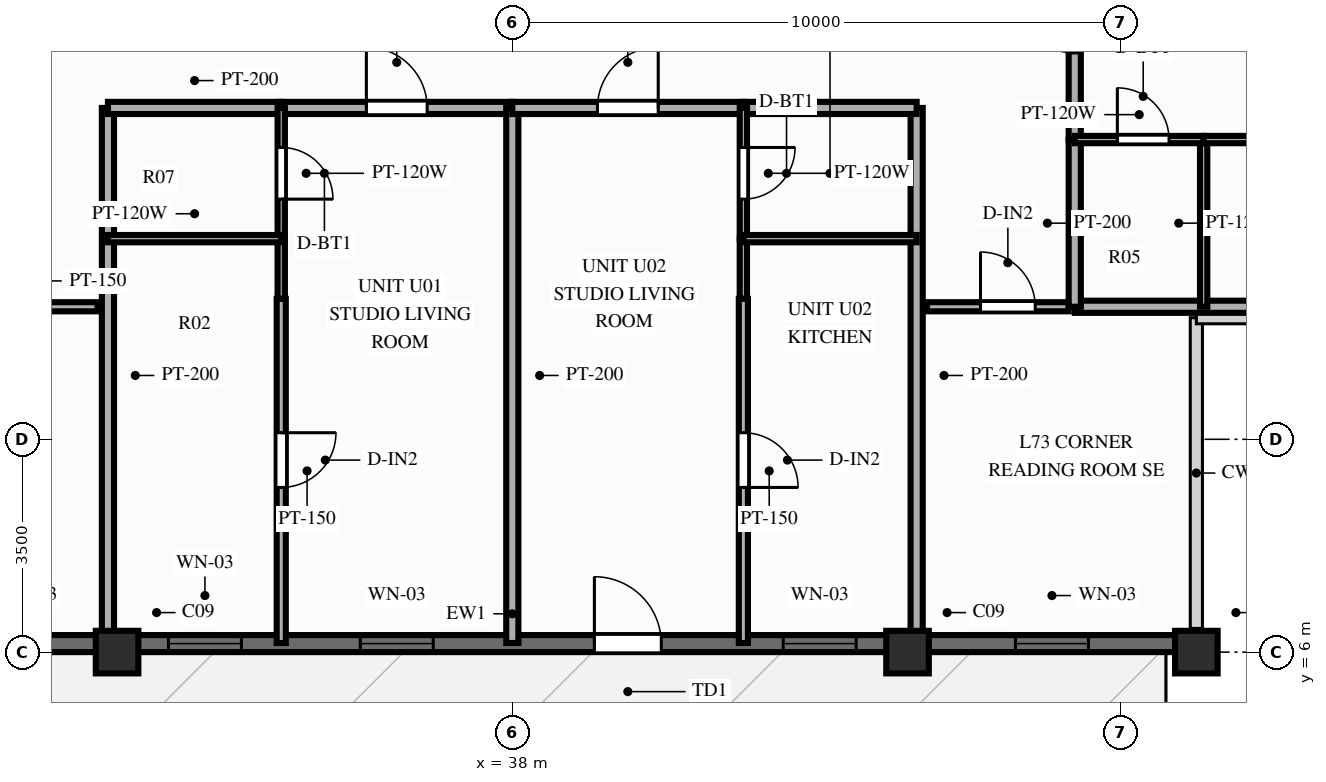
"""IFC4 building model, lengths in metres.
Left out: names, types, materials, properties, quantities, classifications, styles, units other than length and angle.
Written with IfcOpenShell. Run it as: python <this file> out.ifc"""

import sys

from ifc_helpers import new_model, si_unit, direction, frame, frame_2d, origin, origin_2d, place, context, subcontext, project, spatial, rectangle, extrude, source, transform, mapped, element, fill, save


model = new_model("IFC4")
c1 = context("Model", 3, precision=1e-05, world=origin(), true_north=direction((0.0, 1.0)))
c2 = subcontext(c1, "Body", "Model", "MODEL_VIEW")
j1 = project(units=[si_unit("LENGTHUNIT", "METRE"), si_unit("PLANEANGLEUNIT", "RADIAN")], contexts=[c1])
p1 = place(None, origin())
s1 = spatial("IfcSite", under=j1, at=p1, CompositionType="ELEMENT")
p2 = place(p1, origin())
s2 = spatial("IfcBuilding", under=s1, at=p2, CompositionType="ELEMENT")
p3 = place(p2, frame((0.0, 0.0, 236.1)))
s3 = spatial("IfcBuildingStorey", under=s2, at=p3, CompositionType="ELEMENT", Elevation=236.1)
m1 = source(origin(), c2, "Body", "SweptSolid", [
    extrude(rectangle(XDim=0.7, YDim=0.7, at=origin_2d()), origin(), (0.0, 0.0, 1.0), 3.9),
])
for number, where, z_axis, x_axis in (
    (1, (31.5, 6.0, 0.0), (0.0, 0.0, 1.0), (1.0, 0.0, 0.0)),
    (2, (44.5, 6.0, 0.0), (0.0, 0.0, 1.0), (1.0, 0.0, 0.0)),
    (3, (49.25, 6.0, 0.0), (0.0, 0.0, 1.0), (1.0, 0.0, 0.0)),
):
    element("IfcColumn", number, at=place(p3, frame(where, z_axis=z_axis, x_axis=x_axis)), inside=s3, PredefinedType="COLUMN", context=c2, shape_type="MappedRepresentation", body=[
        mapped(m1, transform((0.0, 0.0, 0.0), scale=1.0)),
    ])
p4 = place(p3, frame((26.75, 6.14, 0.0), z_axis=(0.0, 0.0, 1.0), x_axis=(1.0, 0.0, 0.0)))
e4 = element("IfcWall", 4, at=p4, inside=s3, PredefinedType="SOLIDWALL", context=c2, shape_type="SweptSolid", body=[
    extrude(rectangle(XDim=22.5, YDim=0.28, at=frame_2d((11.25, 0.0))), origin(), (0.0, 0.0, 1.0), 2.44),
])
p5 = place(p4, frame((1.775, 0.0, 0.25)))
e5 = element("IfcOpeningElement", 5, at=p5, cuts=e4, PredefinedType="OPENING", context=c2, shape_type="SweptSolid", body=[
    extrude(rectangle(XDim=1.2, YDim=1.5, at=frame_2d((0.6, 0.75))), frame((0.0, 0.152, 0.0), z_axis=(0.0, -1.0, 0.0), x_axis=(1.0, 0.0, 0.0)), (0.0, 0.0, 1.0), 0.304),
])
p6 = place(p4, frame((5.595, 0.0, 0.25)))
e6 = element("IfcOpeningElement", 6, at=p6, cuts=e4, PredefinedType="OPENING", context=c2, shape_type="SweptSolid", body=[
    extrude(rectangle(XDim=1.2, YDim=1.5, at=frame_2d((0.6, 0.75))), frame((0.0, 0.152, 0.0), z_axis=(0.0, -1.0, 0.0), x_axis=(1.0, 0.0, 0.0)), (0.0, 0.0, 1.0), 0.304),
])
p7 = place(p4, frame((8.75, 0.0, 0.25)))
e7 = element("IfcOpeningElement", 7, at=p7, cuts=e4, PredefinedType="OPENING", context=c2, shape_type="SweptSolid", body=[
    extrude(rectangle(XDim=1.2, YDim=1.5, at=frame_2d((0.6, 0.75))), frame((0.0, 0.152, 0.0), z_axis=(0.0, -1.0, 0.0), x_axis=(1.0, 0.0, 0.0)), (0.0, 0.0, 1.0), 0.304),
])
p8 = place(p4, frame((13.7, 0.0, 0.0), z_axis=(0.0, 0.0, 1.0), x_axis=(-1.0, 0.0, 0.0)))
e8 = element("IfcOpeningElement", 8, at=p8, cuts=e4, PredefinedType="OPENING", context=c2, shape_type="SweptSolid", body=[
    extrude(rectangle(XDim=1.1, YDim=2.15, at=frame_2d((0.55, 1.075))), frame((0.0, 0.152, 0.0), z_axis=(0.0, -1.0, 0.0), x_axis=(1.0, 0.0, 0.0)), (0.0, 0.0, 1.0), 0.304),
])
p9 = place(p4, frame((15.705, 0.0, 0.25)))
e9 = element("IfcOpeningElement", 9, at=p9, cuts=e4, PredefinedType="OPENING", context=c2, shape_type="SweptSolid", body=[
    extrude(rectangle(XDim=1.2, YDim=1.5, at=frame_2d((0.6, 0.75))), frame((0.0, 0.152, 0.0), z_axis=(0.0, -1.0, 0.0), x_axis=(1.0, 0.0, 0.0)), (0.0, 0.0, 1.0), 0.304),
])
p10 = place(p4, frame((19.525, 0.0, 0.25)))
e10 = element("IfcOpeningElement", 10, at=p10, cuts=e4, PredefinedType="OPENING", context=c2, shape_type="SweptSolid", body=[
    extrude(rectangle(XDim=1.2, YDim=1.5, at=frame_2d((0.6, 0.75))), frame((0.0, 0.152, 0.0), z_axis=(0.0, -1.0, 0.0), x_axis=(1.0, 0.0, 0.0)), (0.0, 0.0, 1.0), 0.304),
])
p11 = place(p3, frame((28.85, 11.68, 0.0), z_axis=(0.0, 0.0, 1.0), x_axis=(1.0, 0.0, 0.0)))
e11 = element("IfcWall", 11, at=p11, inside=s3, PredefinedType="PARTITIONING", context=c2, shape_type="SweptSolid", body=[
    extrude(rectangle(XDim=2.33, YDim=0.15, at=frame_2d((1.165, 0.0))), origin(), (0.0, 0.0, 1.0), 2.24),
])
p12 = place(p11, frame((0.55, 0.0, 0.0)))
e12 = element("IfcOpeningElement", 12, at=p12, cuts=e11, PredefinedType="OPENING", context=c2, shape_type="SweptSolid", body=[
    extrude(rectangle(XDim=0.9, YDim=2.1, at=frame_2d((0.45, 1.05))), frame((0.0, 0.087, 0.0), z_axis=(0.0, -1.0, 0.0), x_axis=(1.0, 0.0, 0.0)), (0.0, 0.0, 1.0), 0.174),
])
p13 = place(p3, frame((44.82, 11.68, 0.0), z_axis=(0.0, 0.0, 1.0), x_axis=(1.0, 0.0, 0.0)))
e13 = element("IfcWall", 13, at=p13, inside=s3, PredefinedType="PARTITIONING", context=c2, shape_type="SweptSolid", body=[
    extrude(rectangle(XDim=2.33, YDim=0.15, at=frame_2d((1.165, 0.0))), origin(), (0.0, 0.0, 1.0), 2.24),
])
p14 = place(p13, frame((0.88, 0.0, 0.0)))
e14 = element("IfcOpeningElement", 14, at=p14, cuts=e13, PredefinedType="OPENING", context=c2, shape_type="SweptSolid", body=[
    extrude(rectangle(XDim=0.9, YDim=2.1, at=frame_2d((0.45, 1.05))), frame((0.0, 0.087, 0.0), z_axis=(0.0, -1.0, 0.0), x_axis=(1.0, 0.0, 0.0)), (0.0, 0.0, 1.0), 0.174),
])
for number, where, z_axis, x_axis in (
    (15, (31.35, 14.95, 0.0), (0.0, 0.0, 1.0), (0.0, -1.0, 0.0)),
    (16, (44.65, 14.95, 0.0), (0.0, 0.0, 1.0), (0.0, -1.0, 0.0)),
):
    element("IfcWall", number, at=place(p3, frame(where, z_axis=z_axis, x_axis=x_axis)), inside=s3, PredefinedType="PARTITIONING", context=c2, shape_type="SweptSolid", body=[
        extrude(rectangle(XDim=8.8, YDim=0.2, at=frame_2d((4.4, 0.0))), origin(), (0.0, 0.0, 1.0), 2.44),
    ])
p15 = place(p3, frame((31.35, 14.95, 0.0), z_axis=(0.0, 0.0, 1.0), x_axis=(1.0, 0.0, 0.0)))
e17 = element("IfcWall", 17, at=p15, inside=s3, PredefinedType="PARTITIONING", context=c2, shape_type="SweptSolid", body=[
    extrude(rectangle(XDim=2.85, YDim=0.2, at=frame_2d((1.425, 0.0))), origin(), (0.0, 0.0, 1.0), 3.56),
])
p16 = place(p3, frame((34.2, 14.95, 0.0), z_axis=(0.0, 0.0, 1.0), x_axis=(1.0, 0.0, 0.0)))
e18 = element("IfcWall", 18, at=p16, inside=s3, PredefinedType="PARTITIONING", context=c2, shape_type="SweptSolid", body=[
    extrude(rectangle(XDim=3.8, YDim=0.2, at=frame_2d((1.9, 0.0))), origin(), (0.0, 0.0, 1.0), 3.56),
])
p17 = place(p16, frame((1.4, 0.0, 0.0)))
e19 = element("IfcOpeningElement", 19, at=p17, cuts=e18, PredefinedType="OPENING", context=c2, shape_type="SweptSolid", body=[
    extrude(rectangle(XDim=1.0, YDim=2.15, at=frame_2d((0.5, 1.075))), frame((0.0, 0.112, 0.0), z_axis=(0.0, -1.0, 0.0), x_axis=(1.0, 0.0, 0.0)), (0.0, 0.0, 1.0), 0.224),
])
p18 = place(p3, frame((34.2, 14.95, 0.0), z_axis=(0.0, 0.0, 1.0), x_axis=(0.0, -1.0, 0.0)))
e20 = element("IfcWall", 20, at=p18, inside=s3, PredefinedType="PARTITIONING", context=c2, shape_type="SweptSolid", body=[
    extrude(rectangle(XDim=2.15, YDim=0.12, at=frame_2d((1.075, 0.0))), origin(), (0.0, 0.0, 1.0), 3.56),
])
p19 = place(p18, frame((0.65, 0.0, 0.0)))
e21 = element("IfcOpeningElement", 21, at=p19, cuts=e20, PredefinedType="OPENING", context=c2, shape_type="SweptSolid", body=[
    extrude(rectangle(XDim=0.85, YDim=2.05, at=frame_2d((0.425, 1.025))), frame((0.0, 0.072, 0.0), z_axis=(0.0, -1.0, 0.0), x_axis=(1.0, 0.0, 0.0)), (0.0, 0.0, 1.0), 0.144),
])
p20 = place(p3, frame((34.2, 12.8, 0.0), z_axis=(0.0, 0.0, 1.0), x_axis=(0.0, -1.0, 0.0)))
e22 = element("IfcWall", 22, at=p20, inside=s3, PredefinedType="PARTITIONING", context=c2, shape_type="SweptSolid", body=[
    extrude(rectangle(XDim=0.99, YDim=0.12, at=frame_2d((0.495, 0.0))), origin(), (0.0, 0.0, 1.0), 3.56),
])
p21 = place(p3, frame((31.35, 12.8, 0.0), z_axis=(0.0, 0.0, 1.0), x_axis=(1.0, 0.0, 0.0)))
e23 = element("IfcWall", 23, at=p21, inside=s3, PredefinedType="PARTITIONING", context=c2, shape_type="SweptSolid", body=[
    extrude(rectangle(XDim=2.85, YDim=0.12, at=frame_2d((1.425, 0.0))), origin(), (0.0, 0.0, 1.0), 3.56),
])
p22 = place(p3, frame((34.2, 11.81, 0.0), z_axis=(0.0, 0.0, 1.0), x_axis=(0.0, -1.0, 0.0)))
e24 = element("IfcWall", 24, at=p22, inside=s3, PredefinedType="PARTITIONING", context=c2, shape_type="SweptSolid", body=[
    extrude(rectangle(XDim=5.66, YDim=0.15, at=frame_2d((2.83, 0.0))), origin(), (0.0, 0.0, 1.0), 3.56),
])
p23 = place(p22, frame((2.202, 0.0, 0.0)))
e25 = element("IfcOpeningElement", 25, at=p23, cuts=e24, PredefinedType="OPENING", context=c2, shape_type="SweptSolid", body=[
    extrude(rectangle(XDim=0.9, YDim=2.1, at=frame_2d((0.45, 1.05))), frame((0.0, 0.087, 0.0), z_axis=(0.0, -1.0, 0.0), x_axis=(1.0, 0.0, 0.0)), (0.0, 0.0, 1.0), 0.174),
])
p24 = place(p3, frame((38.0, 14.95, 0.0), z_axis=(0.0, 0.0, 1.0), x_axis=(0.0, -1.0, 0.0)))
e26 = element("IfcWall", 26, at=p24, inside=s3, PredefinedType="PARTITIONING", context=c2, shape_type="SweptSolid", body=[
    extrude(rectangle(XDim=8.8, YDim=0.2, at=frame_2d((4.4, 0.0))), origin(), (0.0, 0.0, 1.0), 3.56),
])
p25 = place(p3, frame((38.0, 14.95, 0.0), z_axis=(0.0, 0.0, 1.0), x_axis=(1.0, 0.0, 0.0)))
e27 = element("IfcWall", 27, at=p25, inside=s3, PredefinedType="PARTITIONING", context=c2, shape_type="SweptSolid", body=[
    extrude(rectangle(XDim=3.8, YDim=0.2, at=frame_2d((1.9, 0.0))), origin(), (0.0, 0.0, 1.0), 3.56),
])
p26 = place(p25, frame((1.4, 0.0, 0.0)))
e28 = element("IfcOpeningElement", 28, at=p26, cuts=e27, PredefinedType="OPENING", context=c2, shape_type="SweptSolid", body=[
    extrude(rectangle(XDim=1.0, YDim=2.15, at=frame_2d((0.5, 1.075))), frame((0.0, 0.112, 0.0), z_axis=(0.0, -1.0, 0.0), x_axis=(1.0, 0.0, 0.0)), (0.0, 0.0, 1.0), 0.224),
])
p27 = place(p3, frame((41.8, 14.95, 0.0), z_axis=(0.0, 0.0, 1.0), x_axis=(1.0, 0.0, 0.0)))
e29 = element("IfcWall", 29, at=p27, inside=s3, PredefinedType="PARTITIONING", context=c2, shape_type="SweptSolid", body=[
    extrude(rectangle(XDim=2.85, YDim=0.2, at=frame_2d((1.425, 0.0))), origin(), (0.0, 0.0, 1.0), 3.56),
])
p28 = place(p3, frame((41.8, 14.95, 0.0), z_axis=(0.0, 0.0, 1.0), x_axis=(0.0, -1.0, 0.0)))
e30 = element("IfcWall", 30, at=p28, inside=s3, PredefinedType="PARTITIONING", context=c2, shape_type="SweptSolid", body=[
    extrude(rectangle(XDim=2.15, YDim=0.12, at=frame_2d((1.075, 0.0))), origin(), (0.0, 0.0, 1.0), 3.56),
])
p29 = place(p28, frame((0.65, 0.0, 0.0)))
e31 = element("IfcOpeningElement", 31, at=p29, cuts=e30, PredefinedType="OPENING", context=c2, shape_type="SweptSolid", body=[
    extrude(rectangle(XDim=0.85, YDim=2.05, at=frame_2d((0.425, 1.025))), frame((0.0, 0.072, 0.0), z_axis=(0.0, -1.0, 0.0), x_axis=(1.0, 0.0, 0.0)), (0.0, 0.0, 1.0), 0.144),
])
p30 = place(p3, frame((41.8, 12.8, 0.0), z_axis=(0.0, 0.0, 1.0), x_axis=(0.0, -1.0, 0.0)))
e32 = element("IfcWall", 32, at=p30, inside=s3, PredefinedType="PARTITIONING", context=c2, shape_type="SweptSolid", body=[
    extrude(rectangle(XDim=0.99, YDim=0.12, at=frame_2d((0.495, 0.0))), origin(), (0.0, 0.0, 1.0), 3.56),
])
p31 = place(p3, frame((41.8, 12.8, 0.0), z_axis=(0.0, 0.0, 1.0), x_axis=(1.0, 0.0, 0.0)))
e33 = element("IfcWall", 33, at=p31, inside=s3, PredefinedType="PARTITIONING", context=c2, shape_type="SweptSolid", body=[
    extrude(rectangle(XDim=2.85, YDim=0.12, at=frame_2d((1.425, 0.0))), origin(), (0.0, 0.0, 1.0), 3.56),
])
p32 = place(p3, frame((41.8, 11.81, 0.0), z_axis=(0.0, 0.0, 1.0), x_axis=(0.0, -1.0, 0.0)))
e34 = element("IfcWall", 34, at=p32, inside=s3, PredefinedType="PARTITIONING", context=c2, shape_type="SweptSolid", body=[
    extrude(rectangle(XDim=5.66, YDim=0.15, at=frame_2d((2.83, 0.0))), origin(), (0.0, 0.0, 1.0), 3.56),
])
p33 = place(p32, frame((2.202, 0.0, 0.0)))
e35 = element("IfcOpeningElement", 35, at=p33, cuts=e34, PredefinedType="OPENING", context=c2, shape_type="SweptSolid", body=[
    extrude(rectangle(XDim=0.9, YDim=2.1, at=frame_2d((0.45, 1.05))), frame((0.0, 0.087, 0.0), z_axis=(0.0, -1.0, 0.0), x_axis=(1.0, 0.0, 0.0)), (0.0, 0.0, 1.0), 0.174),
])
p34 = place(p3, frame((47.25, 11.68, 0.0), z_axis=(0.0, 0.0, 1.0), x_axis=(1.0, 0.0, 0.0)))
e36 = element("IfcWall", 36, at=p34, inside=s3, PredefinedType="PARTITIONING", context=c2, shape_type="SweptSolid", body=[
    extrude(rectangle(XDim=7.35, YDim=0.2, at=frame_2d((3.675, 0.0))), origin(), (0.0, 0.0, 1.0), 2.24),
])
p35 = place(p3, frame((47.25, 11.68, 0.0), z_axis=(0.0, 0.0, 1.0), x_axis=(0.0, 1.0, 0.0)))
e37 = element("IfcWall", 37, at=p35, inside=s3, PredefinedType="PARTITIONING", context=c2, shape_type="SweptSolid", body=[
    extrude(rectangle(XDim=2.75, YDim=0.2, at=frame_2d((1.375, 0.0))), origin(), (0.0, 0.0, 1.0), 2.24),
])
p36 = place(p3, frame((47.25, 14.43, 0.0), z_axis=(0.0, 0.0, 1.0), x_axis=(0.0, 1.0, 0.0)))
e38 = element("IfcWall", 38, at=p36, inside=s3, PredefinedType="PARTITIONING", context=c2, shape_type="SweptSolid", body=[
    extrude(rectangle(XDim=3.85, YDim=0.2, at=frame_2d((1.925, 0.0))), origin(), (0.0, 0.0, 1.0), 2.24),
])
p37 = place(p36, frame((1.425, 0.0, 0.0)))
e39 = element("IfcOpeningElement", 39, at=p37, cuts=e38, PredefinedType="OPENING", context=c2, shape_type="SweptSolid", body=[
    extrude(rectangle(XDim=1.0, YDim=2.15, at=frame_2d((0.5, 1.075))), frame((0.0, 0.112, 0.0), z_axis=(0.0, -1.0, 0.0), x_axis=(1.0, 0.0, 0.0)), (0.0, 0.0, 1.0), 0.224),
])
p38 = place(p3, frame((49.37, 11.68, 0.0), z_axis=(0.0, 0.0, 1.0), x_axis=(0.0, 1.0, 0.0)))
e40 = element("IfcWall", 40, at=p38, inside=s3, PredefinedType="PARTITIONING", context=c2, shape_type="SweptSolid", body=[
    extrude(rectangle(XDim=2.75, YDim=0.12, at=frame_2d((1.375, 0.0))), origin(), (0.0, 0.0, 1.0), 3.56),
])
p39 = place(p3, frame((47.25, 14.43, 0.0), z_axis=(0.0, 0.0, 1.0), x_axis=(1.0, 0.0, 0.0)))
e41 = element("IfcWall", 41, at=p39, inside=s3, PredefinedType="PARTITIONING", context=c2, shape_type="SweptSolid", body=[
    extrude(rectangle(XDim=2.12, YDim=0.12, at=frame_2d((1.06, 0.0))), origin(), (0.0, 0.0, 1.0), 3.56),
])
p40 = place(p39, frame((0.701, 0.0, 0.0)))
e42 = element("IfcOpeningElement", 42, at=p40, cuts=e41, PredefinedType="OPENING", context=c2, shape_type="SweptSolid", body=[
    extrude(rectangle(XDim=0.85, YDim=2.05, at=frame_2d((0.425, 1.025))), frame((0.0, 0.072, 0.0), z_axis=(0.0, -1.0, 0.0), x_axis=(1.0, 0.0, 0.0)), (0.0, 0.0, 1.0), 0.144),
])
p41 = place(p3, frame((49.37, 14.43, 0.0), z_axis=(0.0, 0.0, 1.0), x_axis=(1.0, 0.0, 0.0)))
e43 = element("IfcWall", 43, at=p41, inside=s3, PredefinedType="PARTITIONING", context=c2, shape_type="SweptSolid", body=[
    extrude(rectangle(XDim=1.02, YDim=0.12, at=frame_2d((0.51, 0.0))), origin(), (0.0, 0.0, 1.0), 3.56),
])
m2 = source(origin(), c2, "Body", "SweptSolid", [
    extrude(rectangle(XDim=1.2, YDim=1.5, at=frame_2d((0.6, 0.75))), frame((0.0, 0.03, 0.0), z_axis=(0.0, -1.0, 0.0), x_axis=(1.0, 0.0, 0.0)), (0.0, 0.0, 1.0), 0.06),
])
p42 = place(p6, origin())
e44 = element("IfcWindow", 44, at=p42, inside=s3, PartitioningType="SINGLE_PANEL", PredefinedType="WINDOW", context=c2, shape_type="MappedRepresentation", body=[
    mapped(m2, transform((0.0, 0.0, 0.0), scale=1.0)),
])
fill(e6, e44)
p43 = place(p7, origin())
e45 = element("IfcWindow", 45, at=p43, inside=s3, PartitioningType="SINGLE_PANEL", PredefinedType="WINDOW", context=c2, shape_type="MappedRepresentation", body=[
    mapped(m2, transform((0.0, 0.0, 0.0), scale=1.0)),
])
fill(e7, e45)
m3 = source(origin(), c2, "Body", "SweptSolid", [
    extrude(rectangle(XDim=1.1, YDim=2.15, at=frame_2d((0.55, 1.075))), frame((0.0, 0.025, 0.0), z_axis=(0.0, -1.0, 0.0), x_axis=(1.0, 0.0, 0.0)), (0.0, 0.0, 1.0), 0.05),
])
p44 = place(p8, origin())
e46 = element("IfcDoor", 46, at=p44, inside=s3, OperationType="SINGLE_SWING_RIGHT", PredefinedType="DOOR", context=c2, shape_type="MappedRepresentation", body=[
    mapped(m3, transform((0.0, 0.0, 0.0), scale=1.0)),
])
fill(e8, e46)
p45 = place(p9, origin())
e47 = element("IfcWindow", 47, at=p45, inside=s3, PartitioningType="SINGLE_PANEL", PredefinedType="WINDOW", context=c2, shape_type="MappedRepresentation", body=[
    mapped(m2, transform((0.0, 0.0, 0.0), scale=1.0)),
])
fill(e9, e47)
p46 = place(p10, origin())
e48 = element("IfcWindow", 48, at=p46, inside=s3, PartitioningType="SINGLE_PANEL", PredefinedType="WINDOW", context=c2, shape_type="MappedRepresentation", body=[
    mapped(m2, transform((0.0, 0.0, 0.0), scale=1.0)),
])
fill(e10, e48)
m4 = source(origin(), c2, "Body", "SweptSolid", [
    extrude(rectangle(XDim=0.9, YDim=2.1, at=frame_2d((0.45, 1.05))), frame((0.0, 0.025, 0.0), z_axis=(0.0, -1.0, 0.0), x_axis=(1.0, 0.0, 0.0)), (0.0, 0.0, 1.0), 0.05),
])
p47 = place(p14, origin())
e49 = element("IfcDoor", 49, at=p47, inside=s3, OperationType="SINGLE_SWING_LEFT", PredefinedType="DOOR", context=c2, shape_type="MappedRepresentation", body=[
    mapped(m4, transform((0.0, 0.0, 0.0), scale=1.0)),
])
fill(e14, e49)
m5 = source(origin(), c2, "Body", "SweptSolid", [
    extrude(rectangle(XDim=1.0, YDim=2.15, at=frame_2d((0.5, 1.075))), frame((0.0, 0.025, 0.0), z_axis=(0.0, -1.0, 0.0), x_axis=(1.0, 0.0, 0.0)), (0.0, 0.0, 1.0), 0.05),
])
p48 = place(p17, origin())
e50 = element("IfcDoor", 50, at=p48, inside=s3, OperationType="SINGLE_SWING_LEFT", PredefinedType="DOOR", context=c2, shape_type="MappedRepresentation", body=[
    mapped(m5, transform((0.0, 0.0, 0.0), scale=1.0)),
])
fill(e19, e50)
m6 = source(origin(), c2, "Body", "SweptSolid", [
    extrude(rectangle(XDim=0.85, YDim=2.05, at=frame_2d((0.425, 1.025))), frame((0.0, 0.025, 0.0), z_axis=(0.0, -1.0, 0.0), x_axis=(1.0, 0.0, 0.0)), (0.0, 0.0, 1.0), 0.05),
])
p49 = place(p19, origin())
e51 = element("IfcDoor", 51, at=p49, inside=s3, OperationType="SINGLE_SWING_RIGHT", PredefinedType="DOOR", context=c2, shape_type="MappedRepresentation", body=[
    mapped(m6, transform((0.0, 0.0, 0.0), scale=1.0)),
])
fill(e21, e51)
p50 = place(p23, origin())
e52 = element("IfcDoor", 52, at=p50, inside=s3, OperationType="SINGLE_SWING_LEFT", PredefinedType="DOOR", context=c2, shape_type="MappedRepresentation", body=[
    mapped(m4, transform((0.0, 0.0, 0.0), scale=1.0)),
])
fill(e25, e52)
p51 = place(p26, origin())
e53 = element("IfcDoor", 53, at=p51, inside=s3, OperationType="SINGLE_SWING_RIGHT", PredefinedType="DOOR", context=c2, shape_type="MappedRepresentation", body=[
    mapped(m5, transform((0.0, 0.0, 0.0), scale=1.0)),
])
fill(e28, e53)
p52 = place(p29, origin())
e54 = element("IfcDoor", 54, at=p52, inside=s3, OperationType="SINGLE_SWING_LEFT", PredefinedType="DOOR", context=c2, shape_type="MappedRepresentation", body=[
    mapped(m6, transform((0.0, 0.0, 0.0), scale=1.0)),
])
fill(e31, e54)
p53 = place(p33, origin())
e55 = element("IfcDoor", 55, at=p53, inside=s3, OperationType="SINGLE_SWING_RIGHT", PredefinedType="DOOR", context=c2, shape_type="MappedRepresentation", body=[
    mapped(m4, transform((0.0, 0.0, 0.0), scale=1.0)),
])
fill(e35, e55)
p54 = place(p37, origin())
e56 = element("IfcDoor", 56, at=p54, inside=s3, OperationType="SINGLE_SWING_RIGHT", PredefinedType="DOOR", context=c2, shape_type="MappedRepresentation", body=[
    mapped(m5, transform((0.0, 0.0, 0.0), scale=1.0)),
])
fill(e39, e56)
p55 = place(p40, origin())
e57 = element("IfcDoor", 57, at=p55, inside=s3, OperationType="SINGLE_SWING_LEFT", PredefinedType="DOOR", context=c2, shape_type="MappedRepresentation", body=[
    mapped(m6, transform((0.0, 0.0, 0.0), scale=1.0)),
])
fill(e42, e57)
save(model, sys.argv[1])
